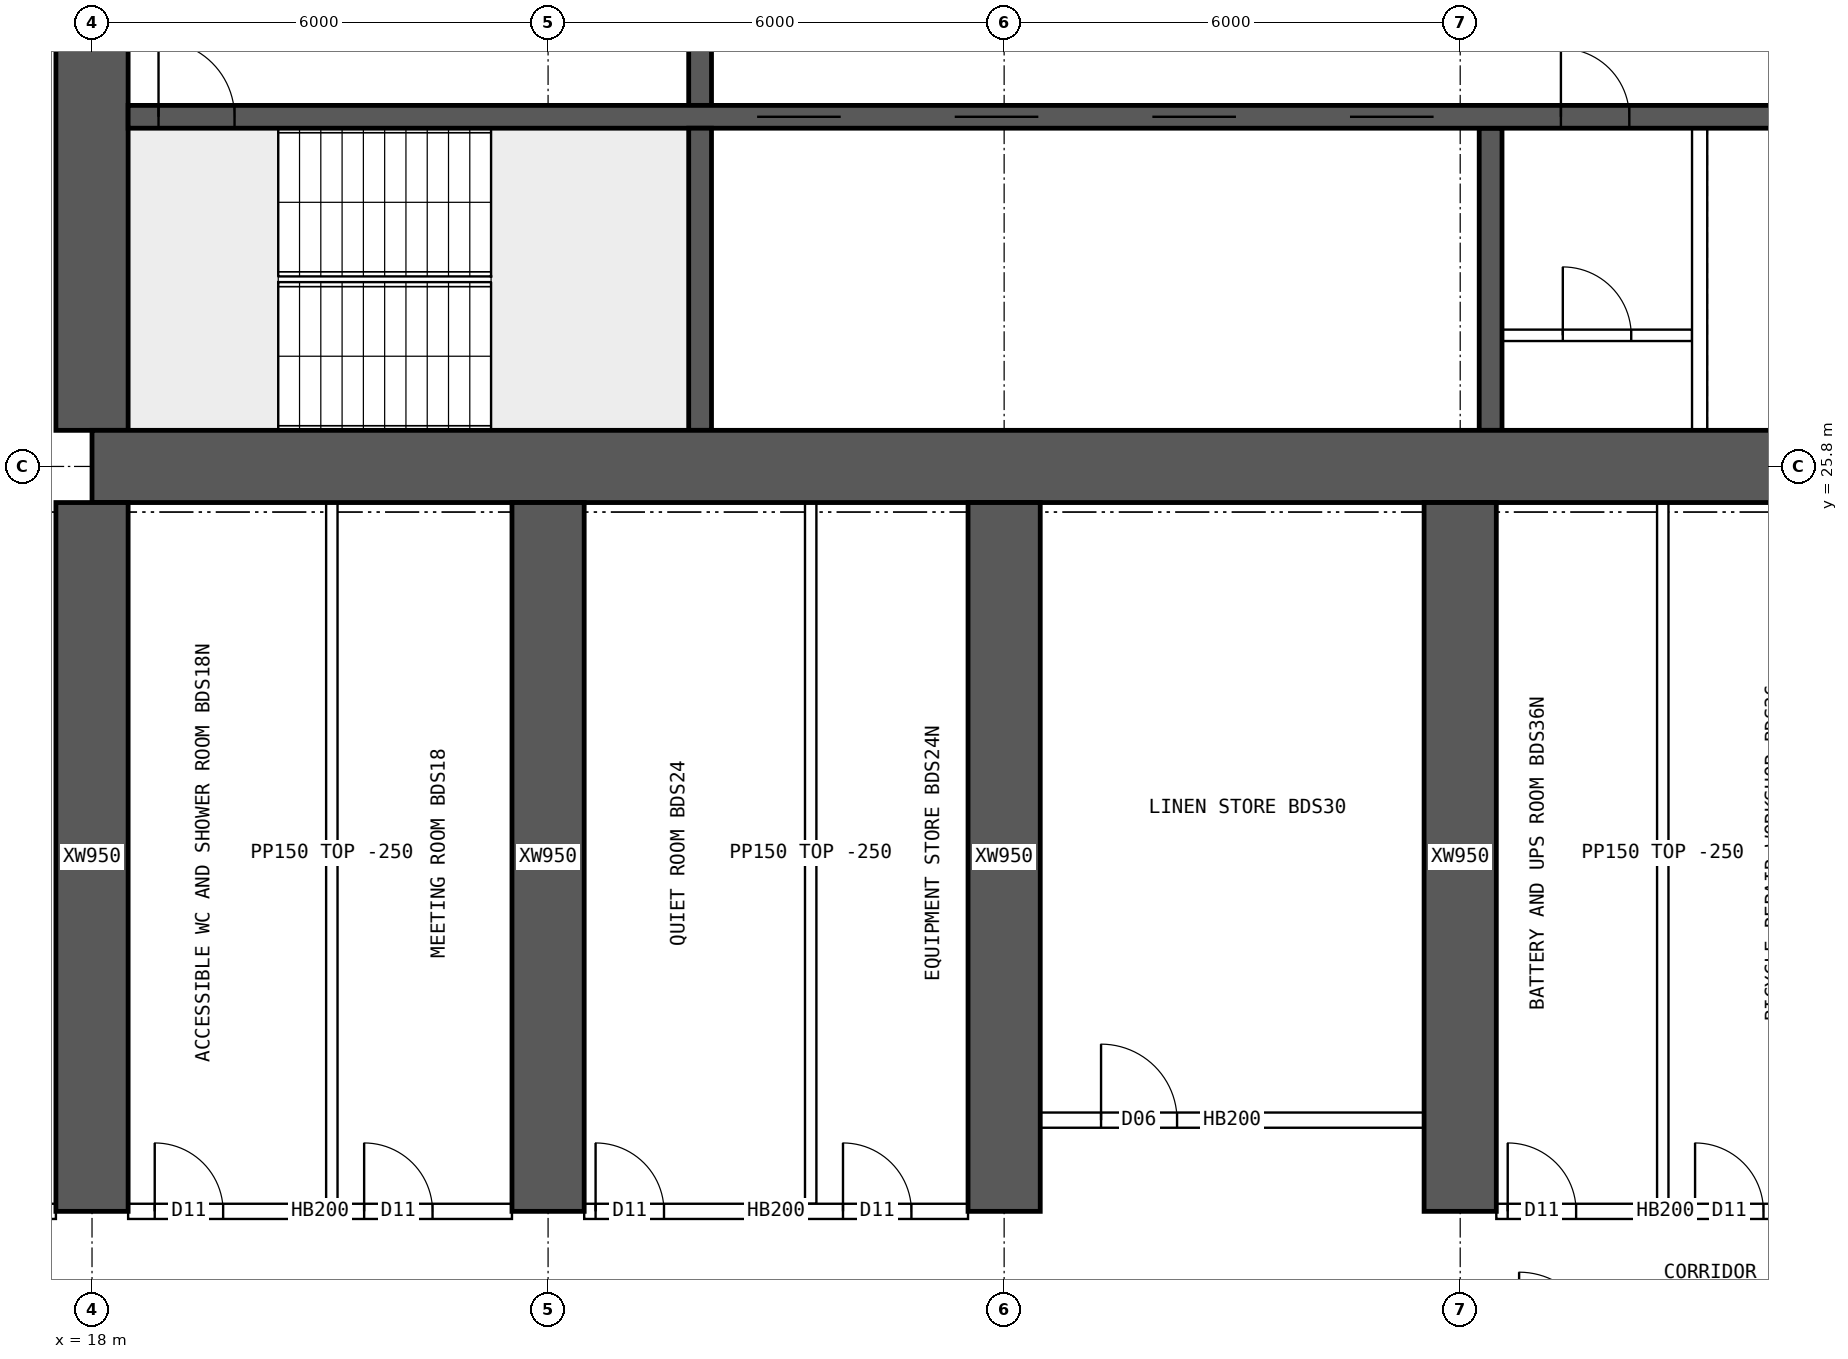
"""IFC4 building model, lengths in metres.
Left out: names, types, materials, properties, quantities, classifications, styles, units other than length and angle.
Written with IfcOpenShell. Run it as: python <this file> out.ifc"""

import sys

from ifc_helpers import new_model, si_unit, direction, frame, frame_2d, origin, place, context, subcontext, project, spatial, rectangle, extrude, element, fill, save


model = new_model("IFC4")
c1 = context("Model", 3, precision=1e-05, world=origin(), true_north=direction((0.0, 1.0)))
c2 = subcontext(c1, "Body", "Model", "MODEL_VIEW")
j1 = project(units=[si_unit("LENGTHUNIT", "METRE"), si_unit("PLANEANGLEUNIT", "RADIAN")], contexts=[c1])
p1 = place(None, origin())
s1 = spatial("IfcSite", under=j1, at=p1, CompositionType="ELEMENT")
p2 = place(p1, origin())
s2 = spatial("IfcBuilding", under=s1, at=p2, CompositionType="ELEMENT")
p3 = place(p2, frame((0.0, 0.0, 121.9)))
s3 = spatial("IfcBuildingStorey", under=s2, at=p3, CompositionType="ELEMENT", Elevation=121.9)
p4 = place(p3, frame((18.0, 25.8, 0.0), z_axis=(0.0, 0.0, 1.0), x_axis=(1.0, 0.0, 0.0)))
e1 = element("IfcWall", 1, at=p4, inside=s3, PredefinedType="SHEAR", context=c2, shape_type="SweptSolid", body=[
    extrude(rectangle(XDim=48.0, YDim=0.95, at=frame_2d((24.0, 0.0))), origin(), (0.0, 0.0, 1.0), 3.75),
])
p5 = place(p3, frame((18.0, 26.275, 0.0), z_axis=(0.0, 0.0, 1.0), x_axis=(0.0, 1.0, 0.0)))
e2 = element("IfcWall", 2, at=p5, inside=s3, PredefinedType="SHEAR", context=c2, shape_type="SweptSolid", body=[
    extrude(rectangle(XDim=11.45, YDim=0.95, at=frame_2d((5.725, 0.0))), origin(), (0.0, 0.0, 1.0), 3.75),
])
p6 = place(p5, frame((5.025, 0.0, 0.0)))
e3 = element("IfcOpeningElement", 3, at=p6, cuts=e2, PredefinedType="OPENING", context=c2, shape_type="SweptSolid", body=[
    extrude(rectangle(XDim=1.2, YDim=2.1, at=frame_2d((0.6, 1.05))), frame((0.0, 0.485, 0.0), z_axis=(0.0, -1.0, 0.0), x_axis=(1.0, 0.0, 0.0)), (0.0, 0.0, 1.0), 0.97),
])
p7 = place(p3, frame((18.475, 30.4, 0.0), z_axis=(0.0, 0.0, 1.0), x_axis=(1.0, 0.0, 0.0)))
e4 = element("IfcWall", 4, at=p7, inside=s3, PredefinedType="SHEAR", context=c2, shape_type="SweptSolid", body=[
    extrude(rectangle(XDim=47.05, YDim=0.3, at=frame_2d((23.525, 0.0))), origin(), (0.0, 0.0, 1.0), 3.75),
])
p8 = place(p7, frame((0.4, 0.0, 0.0)))
e5 = element("IfcOpeningElement", 5, at=p8, cuts=e4, PredefinedType="OPENING", context=c2, shape_type="SweptSolid", body=[
    extrude(rectangle(XDim=1.0, YDim=2.1, at=frame_2d((0.5, 1.05))), frame((0.0, 0.16, 0.0), z_axis=(0.0, -1.0, 0.0), x_axis=(1.0, 0.0, 0.0)), (0.0, 0.0, 1.0), 0.32),
])
p9 = place(p7, frame((45.65, 0.0, 0.0)))
e6 = element("IfcOpeningElement", 6, at=p9, cuts=e4, PredefinedType="OPENING", context=c2, shape_type="SweptSolid", body=[
    extrude(rectangle(XDim=1.0, YDim=2.1, at=frame_2d((0.5, 1.05))), frame((0.0, 0.16, 0.0), z_axis=(0.0, -1.0, 0.0), x_axis=(1.0, 0.0, 0.0)), (0.0, 0.0, 1.0), 0.32),
])
p10 = place(p7, frame((8.275, 0.0, 0.0)))
e7 = element("IfcOpeningElement", 7, at=p10, cuts=e4, PredefinedType="OPENING", context=c2, shape_type="SweptSolid", body=[
    extrude(rectangle(XDim=1.1, YDim=2.1, at=frame_2d((0.55, 1.05))), frame((0.0, 0.16, 0.0), z_axis=(0.0, -1.0, 0.0), x_axis=(1.0, 0.0, 0.0)), (0.0, 0.0, 1.0), 0.32),
])
p11 = place(p7, frame((10.875, 0.0, 0.0)))
e8 = element("IfcOpeningElement", 8, at=p11, cuts=e4, PredefinedType="OPENING", context=c2, shape_type="SweptSolid", body=[
    extrude(rectangle(XDim=1.1, YDim=2.1, at=frame_2d((0.55, 1.05))), frame((0.0, 0.16, 0.0), z_axis=(0.0, -1.0, 0.0), x_axis=(1.0, 0.0, 0.0)), (0.0, 0.0, 1.0), 0.32),
])
p12 = place(p7, frame((13.475, 0.0, 0.0)))
e9 = element("IfcOpeningElement", 9, at=p12, cuts=e4, PredefinedType="OPENING", context=c2, shape_type="SweptSolid", body=[
    extrude(rectangle(XDim=1.1, YDim=2.1, at=frame_2d((0.55, 1.05))), frame((0.0, 0.16, 0.0), z_axis=(0.0, -1.0, 0.0), x_axis=(1.0, 0.0, 0.0)), (0.0, 0.0, 1.0), 0.32),
])
p13 = place(p7, frame((16.075, 0.0, 0.0)))
e10 = element("IfcOpeningElement", 10, at=p13, cuts=e4, PredefinedType="OPENING", context=c2, shape_type="SweptSolid", body=[
    extrude(rectangle(XDim=1.1, YDim=2.1, at=frame_2d((0.55, 1.05))), frame((0.0, 0.16, 0.0), z_axis=(0.0, -1.0, 0.0), x_axis=(1.0, 0.0, 0.0)), (0.0, 0.0, 1.0), 0.32),
])
p14 = place(p7, frame((18.85, 0.0, 0.0)))
e11 = element("IfcOpeningElement", 11, at=p14, cuts=e4, PredefinedType="OPENING", context=c2, shape_type="SweptSolid", body=[
    extrude(rectangle(XDim=0.9, YDim=2.1, at=frame_2d((0.45, 1.05))), frame((0.0, 0.16, 0.0), z_axis=(0.0, -1.0, 0.0), x_axis=(1.0, 0.0, 0.0)), (0.0, 0.0, 1.0), 0.32),
])
p15 = place(p7, frame((30.142, 0.0, 0.0)))
e12 = element("IfcOpeningElement", 12, at=p15, cuts=e4, PredefinedType="OPENING", context=c2, shape_type="SweptSolid", body=[
    extrude(rectangle(XDim=1.1, YDim=2.1, at=frame_2d((0.55, 1.05))), frame((0.0, 0.16, 0.0), z_axis=(0.0, -1.0, 0.0), x_axis=(1.0, 0.0, 0.0)), (0.0, 0.0, 1.0), 0.32),
])
p16 = place(p7, frame((33.675, 0.0, 0.0)))
e13 = element("IfcOpeningElement", 13, at=p16, cuts=e4, PredefinedType="OPENING", context=c2, shape_type="SweptSolid", body=[
    extrude(rectangle(XDim=1.1, YDim=2.1, at=frame_2d((0.55, 1.05))), frame((0.0, 0.16, 0.0), z_axis=(0.0, -1.0, 0.0), x_axis=(1.0, 0.0, 0.0)), (0.0, 0.0, 1.0), 0.32),
])
p17 = place(p7, frame((37.208, 0.0, 0.0)))
e14 = element("IfcOpeningElement", 14, at=p17, cuts=e4, PredefinedType="OPENING", context=c2, shape_type="SweptSolid", body=[
    extrude(rectangle(XDim=1.1, YDim=2.1, at=frame_2d((0.55, 1.05))), frame((0.0, 0.16, 0.0), z_axis=(0.0, -1.0, 0.0), x_axis=(1.0, 0.0, 0.0)), (0.0, 0.0, 1.0), 0.32),
])
p18 = place(p3, frame((26.0, 26.275, 0.0), z_axis=(0.0, 0.0, 1.0), x_axis=(0.0, 1.0, 0.0)))
e15 = element("IfcWall", 15, at=p18, inside=s3, PredefinedType="SHEAR", context=c2, shape_type="SweptSolid", body=[
    extrude(rectangle(XDim=3.975, YDim=0.3, at=frame_2d((1.988, 0.0))), origin(), (0.0, 0.0, 1.0), 3.75),
])
p19 = place(p3, frame((26.0, 30.55, 0.0), z_axis=(0.0, 0.0, 1.0), x_axis=(0.0, 1.0, 0.0)))
e16 = element("IfcWall", 16, at=p19, inside=s3, PredefinedType="SHEAR", context=c2, shape_type="SweptSolid", body=[
    extrude(rectangle(XDim=3.9, YDim=0.3, at=frame_2d((1.95, 0.0))), origin(), (0.0, 0.0, 1.0), 3.75),
])
p20 = place(p19, frame((1.4, 0.0, 0.0)))
e17 = element("IfcOpeningElement", 17, at=p20, cuts=e16, PredefinedType="OPENING", context=c2, shape_type="SweptSolid", body=[
    extrude(rectangle(XDim=1.2, YDim=2.1, at=frame_2d((0.6, 1.05))), frame((0.0, 0.16, 0.0), z_axis=(0.0, -1.0, 0.0), x_axis=(1.0, 0.0, 0.0)), (0.0, 0.0, 1.0), 0.32),
])
p21 = place(p3, frame((36.4, 26.275, 0.0), z_axis=(0.0, 0.0, 1.0), x_axis=(0.0, 1.0, 0.0)))
e18 = element("IfcWall", 18, at=p21, inside=s3, PredefinedType="SHEAR", context=c2, shape_type="SweptSolid", body=[
    extrude(rectangle(XDim=3.975, YDim=0.3, at=frame_2d((1.988, 0.0))), origin(), (0.0, 0.0, 1.0), 3.75),
])
for number, where, z_axis, x_axis in (
    (19, (18.0, 16.0, 0.0), (0.0, 0.0, 1.0), (0.0, 1.0, 0.0)),
    (20, (24.0, 16.0, 0.0), (0.0, 0.0, 1.0), (0.0, 1.0, 0.0)),
    (21, (30.0, 16.0, 0.0), (0.0, 0.0, 1.0), (0.0, 1.0, 0.0)),
    (22, (36.0, 16.0, 0.0), (0.0, 0.0, 1.0), (0.0, 1.0, 0.0)),
):
    element("IfcWall", number, at=place(p3, frame(where, z_axis=z_axis, x_axis=x_axis)), inside=s3, PredefinedType="SHEAR", context=c2, shape_type="SweptSolid", body=[
        extrude(rectangle(XDim=9.325, YDim=0.95, at=frame_2d((4.663, 0.0))), origin(), (0.0, 0.0, 1.0), 3.75),
    ])
p22 = place(p3, frame((36.55, 27.525, 0.0), z_axis=(0.0, 0.0, 1.0), x_axis=(1.0, 0.0, 0.0)))
e23 = element("IfcWall", 23, at=p22, inside=s3, PredefinedType="SOLIDWALL", context=c2, shape_type="SweptSolid", body=[
    extrude(rectangle(XDim=2.5, YDim=0.15, at=frame_2d((1.25, 0.0))), origin(), (0.0, 0.0, 1.0), 3.5),
])
p23 = place(p22, frame((0.8, 0.0, 0.0)))
e24 = element("IfcOpeningElement", 24, at=p23, cuts=e23, PredefinedType="OPENING", context=c2, shape_type="SweptSolid", body=[
    extrude(rectangle(XDim=0.9, YDim=2.1, at=frame_2d((0.45, 1.05))), frame((0.0, 0.085, 0.0), z_axis=(0.0, -1.0, 0.0), x_axis=(1.0, 0.0, 0.0)), (0.0, 0.0, 1.0), 0.17),
])
p24 = place(p3, frame((39.15, 26.275, 0.0), z_axis=(0.0, 0.0, 1.0), x_axis=(0.0, 1.0, 0.0)))
e25 = element("IfcWall", 25, at=p24, inside=s3, PredefinedType="SOLIDWALL", context=c2, shape_type="SweptSolid", body=[
    extrude(rectangle(XDim=3.975, YDim=0.2, at=frame_2d((1.988, 0.0))), origin(), (0.0, 0.0, 1.0), 3.5),
])
p25 = place(p3, frame((12.475, 16.0, 0.0), z_axis=(0.0, 0.0, 1.0), x_axis=(1.0, 0.0, 0.0)))
e26 = element("IfcWall", 26, at=p25, inside=s3, PredefinedType="SOLIDWALL", context=c2, shape_type="SweptSolid", body=[
    extrude(rectangle(XDim=5.05, YDim=0.2, at=frame_2d((2.525, 0.0))), origin(), (0.0, 0.0, 1.0), 3.5),
])
p26 = place(p25, frame((3.325, 0.0, 0.0)))
e27 = element("IfcOpeningElement", 27, at=p26, cuts=e26, PredefinedType="OPENING", context=c2, shape_type="SweptSolid", body=[
    extrude(rectangle(XDim=1.6, YDim=2.1, at=frame_2d((0.8, 1.05))), frame((0.0, 0.11, 0.0), z_axis=(0.0, -1.0, 0.0), x_axis=(1.0, 0.0, 0.0)), (0.0, 0.0, 1.0), 0.22),
])
p27 = place(p3, frame((18.475, 16.0, 0.0), z_axis=(0.0, 0.0, 1.0), x_axis=(1.0, 0.0, 0.0)))
e28 = element("IfcWall", 28, at=p27, inside=s3, PredefinedType="SOLIDWALL", context=c2, shape_type="SweptSolid", body=[
    extrude(rectangle(XDim=5.05, YDim=0.2, at=frame_2d((2.525, 0.0))), origin(), (0.0, 0.0, 1.0), 3.5),
])
p28 = place(p27, frame((0.35, 0.0, 0.0)))
e29 = element("IfcOpeningElement", 29, at=p28, cuts=e28, PredefinedType="OPENING", context=c2, shape_type="SweptSolid", body=[
    extrude(rectangle(XDim=0.9, YDim=2.1, at=frame_2d((0.45, 1.05))), frame((0.0, 0.11, 0.0), z_axis=(0.0, -1.0, 0.0), x_axis=(1.0, 0.0, 0.0)), (0.0, 0.0, 1.0), 0.22),
])
p29 = place(p27, frame((3.105, 0.0, 0.0)))
e30 = element("IfcOpeningElement", 30, at=p29, cuts=e28, PredefinedType="OPENING", context=c2, shape_type="SweptSolid", body=[
    extrude(rectangle(XDim=0.9, YDim=2.1, at=frame_2d((0.45, 1.05))), frame((0.0, 0.11, 0.0), z_axis=(0.0, -1.0, 0.0), x_axis=(1.0, 0.0, 0.0)), (0.0, 0.0, 1.0), 0.22),
])
p30 = place(p3, frame((24.475, 16.0, 0.0), z_axis=(0.0, 0.0, 1.0), x_axis=(1.0, 0.0, 0.0)))
e31 = element("IfcWall", 31, at=p30, inside=s3, PredefinedType="SOLIDWALL", context=c2, shape_type="SweptSolid", body=[
    extrude(rectangle(XDim=5.05, YDim=0.2, at=frame_2d((2.525, 0.0))), origin(), (0.0, 0.0, 1.0), 3.5),
])
p31 = place(p30, frame((0.15, 0.0, 0.0)))
e32 = element("IfcOpeningElement", 32, at=p31, cuts=e31, PredefinedType="OPENING", context=c2, shape_type="SweptSolid", body=[
    extrude(rectangle(XDim=0.9, YDim=2.1, at=frame_2d((0.45, 1.05))), frame((0.0, 0.11, 0.0), z_axis=(0.0, -1.0, 0.0), x_axis=(1.0, 0.0, 0.0)), (0.0, 0.0, 1.0), 0.22),
])
p32 = place(p30, frame((3.405, 0.0, 0.0)))
e33 = element("IfcOpeningElement", 33, at=p32, cuts=e31, PredefinedType="OPENING", context=c2, shape_type="SweptSolid", body=[
    extrude(rectangle(XDim=0.9, YDim=2.1, at=frame_2d((0.45, 1.05))), frame((0.0, 0.11, 0.0), z_axis=(0.0, -1.0, 0.0), x_axis=(1.0, 0.0, 0.0)), (0.0, 0.0, 1.0), 0.22),
])
p33 = place(p3, frame((36.475, 16.0, 0.0), z_axis=(0.0, 0.0, 1.0), x_axis=(1.0, 0.0, 0.0)))
e34 = element("IfcWall", 34, at=p33, inside=s3, PredefinedType="SOLIDWALL", context=c2, shape_type="SweptSolid", body=[
    extrude(rectangle(XDim=5.05, YDim=0.2, at=frame_2d((2.525, 0.0))), origin(), (0.0, 0.0, 1.0), 3.5),
])
p34 = place(p33, frame((0.15, 0.0, 0.0)))
e35 = element("IfcOpeningElement", 35, at=p34, cuts=e34, PredefinedType="OPENING", context=c2, shape_type="SweptSolid", body=[
    extrude(rectangle(XDim=0.9, YDim=2.1, at=frame_2d((0.45, 1.05))), frame((0.0, 0.11, 0.0), z_axis=(0.0, -1.0, 0.0), x_axis=(1.0, 0.0, 0.0)), (0.0, 0.0, 1.0), 0.22),
])
p35 = place(p33, frame((2.615, 0.0, 0.0)))
e36 = element("IfcOpeningElement", 36, at=p35, cuts=e34, PredefinedType="OPENING", context=c2, shape_type="SweptSolid", body=[
    extrude(rectangle(XDim=0.9, YDim=2.1, at=frame_2d((0.45, 1.05))), frame((0.0, 0.11, 0.0), z_axis=(0.0, -1.0, 0.0), x_axis=(1.0, 0.0, 0.0)), (0.0, 0.0, 1.0), 0.22),
])
for number, where, z_axis, x_axis in (
    (37, (21.155, 16.1, 0.0), (0.0, 0.0, 1.0), (0.0, 1.0, 0.0)),
    (38, (27.455, 16.1, 0.0), (0.0, 0.0, 1.0), (0.0, 1.0, 0.0)),
):
    element("IfcWall", number, at=place(p3, frame(where, z_axis=z_axis, x_axis=x_axis)), inside=s3, PredefinedType="PARTITIONING", context=c2, shape_type="SweptSolid", body=[
        extrude(rectangle(XDim=9.225, YDim=0.15, at=frame_2d((4.612, 0.0))), origin(), (0.0, 0.0, 1.0), 3.5),
    ])
p36 = place(p3, frame((30.475, 17.2, 0.0), z_axis=(0.0, 0.0, 1.0), x_axis=(1.0, 0.0, 0.0)))
e39 = element("IfcWall", 39, at=p36, inside=s3, PredefinedType="SOLIDWALL", context=c2, shape_type="SweptSolid", body=[
    extrude(rectangle(XDim=5.05, YDim=0.2, at=frame_2d((2.525, 0.0))), origin(), (0.0, 0.0, 1.0), 3.5),
])
p37 = place(p36, frame((0.8, 0.0, 0.0)))
e40 = element("IfcOpeningElement", 40, at=p37, cuts=e39, PredefinedType="OPENING", context=c2, shape_type="SweptSolid", body=[
    extrude(rectangle(XDim=1.0, YDim=2.1, at=frame_2d((0.5, 1.05))), frame((0.0, 0.11, 0.0), z_axis=(0.0, -1.0, 0.0), x_axis=(1.0, 0.0, 0.0)), (0.0, 0.0, 1.0), 0.22),
])
p38 = place(p3, frame((38.665, 16.1, 0.0), z_axis=(0.0, 0.0, 1.0), x_axis=(0.0, 1.0, 0.0)))
e41 = element("IfcWall", 41, at=p38, inside=s3, PredefinedType="PARTITIONING", context=c2, shape_type="SweptSolid", body=[
    extrude(rectangle(XDim=9.225, YDim=0.15, at=frame_2d((4.612, 0.0))), origin(), (0.0, 0.0, 1.0), 3.5),
])
p39 = place(p8, origin())
e42 = element("IfcDoor", 42, at=p39, inside=s3, OperationType="SINGLE_SWING_LEFT", PredefinedType="DOOR", context=c2, shape_type="SweptSolid", body=[
    extrude(rectangle(XDim=1.0, YDim=2.1, at=frame_2d((0.5, 1.05))), frame((0.0, 0.025, 0.0), z_axis=(0.0, -1.0, 0.0), x_axis=(1.0, 0.0, 0.0)), (0.0, 0.0, 1.0), 0.05),
])
fill(e5, e42)
p40 = place(p10, origin())
e43 = element("IfcDoor", 43, at=p40, inside=s3, OperationType="DOUBLE_DOOR_SLIDING", PredefinedType="DOOR", context=c2, shape_type="SweptSolid", body=[
    extrude(rectangle(XDim=1.1, YDim=2.1, at=frame_2d((0.55, 1.05))), frame((0.0, 0.025, 0.0), z_axis=(0.0, -1.0, 0.0), x_axis=(1.0, 0.0, 0.0)), (0.0, 0.0, 1.0), 0.05),
])
fill(e7, e43)
p41 = place(p11, origin())
e44 = element("IfcDoor", 44, at=p41, inside=s3, OperationType="DOUBLE_DOOR_SLIDING", PredefinedType="DOOR", context=c2, shape_type="SweptSolid", body=[
    extrude(rectangle(XDim=1.1, YDim=2.1, at=frame_2d((0.55, 1.05))), frame((0.0, 0.025, 0.0), z_axis=(0.0, -1.0, 0.0), x_axis=(1.0, 0.0, 0.0)), (0.0, 0.0, 1.0), 0.05),
])
fill(e8, e44)
p42 = place(p12, origin())
e45 = element("IfcDoor", 45, at=p42, inside=s3, OperationType="DOUBLE_DOOR_SLIDING", PredefinedType="DOOR", context=c2, shape_type="SweptSolid", body=[
    extrude(rectangle(XDim=1.1, YDim=2.1, at=frame_2d((0.55, 1.05))), frame((0.0, 0.025, 0.0), z_axis=(0.0, -1.0, 0.0), x_axis=(1.0, 0.0, 0.0)), (0.0, 0.0, 1.0), 0.05),
])
fill(e9, e45)
p43 = place(p13, origin())
e46 = element("IfcDoor", 46, at=p43, inside=s3, OperationType="DOUBLE_DOOR_SLIDING", PredefinedType="DOOR", context=c2, shape_type="SweptSolid", body=[
    extrude(rectangle(XDim=1.1, YDim=2.1, at=frame_2d((0.55, 1.05))), frame((0.0, 0.025, 0.0), z_axis=(0.0, -1.0, 0.0), x_axis=(1.0, 0.0, 0.0)), (0.0, 0.0, 1.0), 0.05),
])
fill(e10, e46)
p44 = place(p23, origin())
e47 = element("IfcDoor", 47, at=p44, inside=s3, OperationType="SINGLE_SWING_LEFT", PredefinedType="DOOR", context=c2, shape_type="SweptSolid", body=[
    extrude(rectangle(XDim=0.9, YDim=2.1, at=frame_2d((0.45, 1.05))), frame((0.0, 0.025, 0.0), z_axis=(0.0, -1.0, 0.0), x_axis=(1.0, 0.0, 0.0)), (0.0, 0.0, 1.0), 0.05),
])
fill(e24, e47)
p45 = place(p14, origin())
e48 = element("IfcDoor", 48, at=p45, inside=s3, OperationType="SINGLE_SWING_LEFT", PredefinedType="DOOR", context=c2, shape_type="SweptSolid", body=[
    extrude(rectangle(XDim=0.9, YDim=2.1, at=frame_2d((0.45, 1.05))), frame((0.0, 0.025, 0.0), z_axis=(0.0, -1.0, 0.0), x_axis=(1.0, 0.0, 0.0)), (0.0, 0.0, 1.0), 0.05),
])
fill(e11, e48)
p46 = place(p28, origin())
e49 = element("IfcDoor", 49, at=p46, inside=s3, OperationType="SINGLE_SWING_LEFT", PredefinedType="DOOR", context=c2, shape_type="SweptSolid", body=[
    extrude(rectangle(XDim=0.9, YDim=2.1, at=frame_2d((0.45, 1.05))), frame((0.0, 0.025, 0.0), z_axis=(0.0, -1.0, 0.0), x_axis=(1.0, 0.0, 0.0)), (0.0, 0.0, 1.0), 0.05),
])
fill(e29, e49)
p47 = place(p29, origin())
e50 = element("IfcDoor", 50, at=p47, inside=s3, OperationType="SINGLE_SWING_LEFT", PredefinedType="DOOR", context=c2, shape_type="SweptSolid", body=[
    extrude(rectangle(XDim=0.9, YDim=2.1, at=frame_2d((0.45, 1.05))), frame((0.0, 0.025, 0.0), z_axis=(0.0, -1.0, 0.0), x_axis=(1.0, 0.0, 0.0)), (0.0, 0.0, 1.0), 0.05),
])
fill(e30, e50)
p48 = place(p31, origin())
e51 = element("IfcDoor", 51, at=p48, inside=s3, OperationType="SINGLE_SWING_LEFT", PredefinedType="DOOR", context=c2, shape_type="SweptSolid", body=[
    extrude(rectangle(XDim=0.9, YDim=2.1, at=frame_2d((0.45, 1.05))), frame((0.0, 0.025, 0.0), z_axis=(0.0, -1.0, 0.0), x_axis=(1.0, 0.0, 0.0)), (0.0, 0.0, 1.0), 0.05),
])
fill(e32, e51)
p49 = place(p32, origin())
e52 = element("IfcDoor", 52, at=p49, inside=s3, OperationType="SINGLE_SWING_LEFT", PredefinedType="DOOR", context=c2, shape_type="SweptSolid", body=[
    extrude(rectangle(XDim=0.9, YDim=2.1, at=frame_2d((0.45, 1.05))), frame((0.0, 0.025, 0.0), z_axis=(0.0, -1.0, 0.0), x_axis=(1.0, 0.0, 0.0)), (0.0, 0.0, 1.0), 0.05),
])
fill(e33, e52)
p50 = place(p37, origin())
e53 = element("IfcDoor", 53, at=p50, inside=s3, OperationType="SINGLE_SWING_LEFT", PredefinedType="DOOR", context=c2, shape_type="SweptSolid", body=[
    extrude(rectangle(XDim=1.0, YDim=2.1, at=frame_2d((0.5, 1.05))), frame((0.0, 0.025, 0.0), z_axis=(0.0, -1.0, 0.0), x_axis=(1.0, 0.0, 0.0)), (0.0, 0.0, 1.0), 0.05),
])
fill(e40, e53)
p51 = place(p34, origin())
e54 = element("IfcDoor", 54, at=p51, inside=s3, OperationType="SINGLE_SWING_LEFT", PredefinedType="DOOR", context=c2, shape_type="SweptSolid", body=[
    extrude(rectangle(XDim=0.9, YDim=2.1, at=frame_2d((0.45, 1.05))), frame((0.0, 0.025, 0.0), z_axis=(0.0, -1.0, 0.0), x_axis=(1.0, 0.0, 0.0)), (0.0, 0.0, 1.0), 0.05),
])
fill(e35, e54)
p52 = place(p35, origin())
e55 = element("IfcDoor", 55, at=p52, inside=s3, OperationType="SINGLE_SWING_LEFT", PredefinedType="DOOR", context=c2, shape_type="SweptSolid", body=[
    extrude(rectangle(XDim=0.9, YDim=2.1, at=frame_2d((0.45, 1.05))), frame((0.0, 0.025, 0.0), z_axis=(0.0, -1.0, 0.0), x_axis=(1.0, 0.0, 0.0)), (0.0, 0.0, 1.0), 0.05),
])
fill(e36, e55)
save(model, sys.argv[1])
